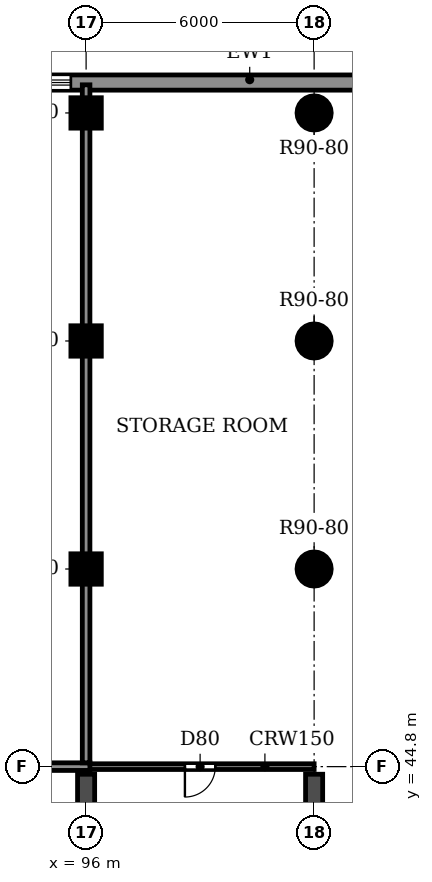
"""IFC4 building model, lengths in metres.
Left out: names, types, materials, properties, quantities, classifications, styles, units other than length and angle.
Written with IfcOpenShell. Run it as: python <this file> out.ifc"""

import sys

from ifc_helpers import new_model, si_unit, direction, frame, frame_2d, origin, origin_2d, place, context, subcontext, project, spatial, rectangle, circle, extrude, source, transform, mapped, element, fill, save


model = new_model("IFC4")
c1 = context("Model", 3, precision=1e-05, world=origin(), true_north=direction((0.0, 1.0)))
c2 = subcontext(c1, "Body", "Model", "MODEL_VIEW")
j1 = project(units=[si_unit("LENGTHUNIT", "METRE"), si_unit("PLANEANGLEUNIT", "RADIAN")], contexts=[c1])
p1 = place(None, origin())
s1 = spatial("IfcSite", under=j1, at=p1, CompositionType="ELEMENT")
p2 = place(p1, origin())
s2 = spatial("IfcBuilding", under=s1, at=p2, CompositionType="ELEMENT")
p3 = place(p2, frame((0.0, 0.0, 10.8)))
s3 = spatial("IfcBuildingStorey", under=s2, at=p3, CompositionType="ELEMENT", Elevation=10.8)
for number, where, z_axis, x_axis in (
    (1, (96.0, 30.55, 0.0), (0.0, 0.0, 1.0), (0.0, 1.0, 0.0)),
    (2, (102.0, 30.55, 0.0), (0.0, 0.0, 1.0), (0.0, 1.0, 0.0)),
):
    element("IfcWall", number, at=place(p3, frame(where, z_axis=z_axis, x_axis=x_axis)), inside=s3, PredefinedType="SHEAR", context=c2, shape_type="SweptSolid", body=[
        extrude(rectangle(XDim=14.05, YDim=0.45, at=frame_2d((7.025, 0.0))), origin(), (0.0, 0.0, 1.0), 3.92),
    ])
m1 = source(origin(), c2, "Body", "SweptSolid", [
    extrude(rectangle(XDim=0.8, YDim=0.8, at=origin_2d()), origin(), (0.0, 0.0, 1.0), 3.92),
])
p4 = place(p3, frame((96.0, 62.0, 0.0), z_axis=(0.0, 0.0, 1.0), x_axis=(1.0, 0.0, 0.0)))
e3 = element("IfcColumn", 3, at=p4, inside=s3, PredefinedType="COLUMN", context=c2, shape_type="MappedRepresentation", body=[
    mapped(m1, transform((0.0, 0.0, 0.0))),
])
m2 = source(origin(), c2, "Body", "SweptSolid", [
    extrude(circle(Radius=0.45, at=origin_2d()), origin(), (0.0, 0.0, 1.0), 3.92),
])
p5 = place(p3, frame((102.0, 62.0, 0.0), z_axis=(0.0, 0.0, 1.0), x_axis=(1.0, 0.0, 0.0)))
e4 = element("IfcColumn", 4, at=p5, inside=s3, PredefinedType="COLUMN", context=c2, shape_type="MappedRepresentation", body=[
    mapped(m2, transform((0.0, 0.0, 0.0))),
])
p6 = place(p3, frame((96.0, 56.0, 0.0), z_axis=(0.0, 0.0, 1.0), x_axis=(1.0, 0.0, 0.0)))
e5 = element("IfcColumn", 5, at=p6, inside=s3, PredefinedType="COLUMN", context=c2, shape_type="MappedRepresentation", body=[
    mapped(m1, transform((0.0, 0.0, 0.0))),
])
p7 = place(p3, frame((102.0, 56.0, 0.0), z_axis=(0.0, 0.0, 1.0), x_axis=(1.0, 0.0, 0.0)))
e6 = element("IfcColumn", 6, at=p7, inside=s3, PredefinedType="COLUMN", context=c2, shape_type="MappedRepresentation", body=[
    mapped(m2, transform((0.0, 0.0, 0.0))),
])
p8 = place(p3, frame((96.0, 50.0, 0.0), z_axis=(0.0, 0.0, 1.0), x_axis=(1.0, 0.0, 0.0)))
e7 = element("IfcColumn", 7, at=p8, inside=s3, PredefinedType="COLUMN", context=c2, shape_type="MappedRepresentation", body=[
    mapped(m1, transform((0.0, 0.0, 0.0))),
])
p9 = place(p3, frame((102.0, 50.0, 0.0), z_axis=(0.0, 0.0, 1.0), x_axis=(1.0, 0.0, 0.0)))
e8 = element("IfcColumn", 8, at=p9, inside=s3, PredefinedType="COLUMN", context=c2, shape_type="MappedRepresentation", body=[
    mapped(m2, transform((0.0, 0.0, 0.0))),
])
p10 = place(p3, frame((105.0, 62.8, 0.0), z_axis=(0.0, 0.0, 1.0), x_axis=(-1.0, 0.0, 0.0)))
e9 = element("IfcWall", 9, at=p10, inside=s3, PredefinedType="STANDARD", context=c2, shape_type="SweptSolid", body=[
    extrude(rectangle(XDim=108.0, YDim=0.4, at=frame_2d((54.0, 0.0))), origin(), (0.0, 0.0, 1.0), 3.92),
])
p11 = place(p10, frame((102.4, 0.0, 0.9)))
e10 = element("IfcOpeningElement", 10, at=p11, cuts=e9, PredefinedType="OPENING", context=c2, shape_type="SweptSolid", body=[
    extrude(rectangle(XDim=2.2, YDim=2.7, at=frame_2d((1.1, 1.35))), frame((0.0, 0.21, 0.0), z_axis=(0.0, -1.0, 0.0), x_axis=(1.0, 0.0, 0.0)), (0.0, 0.0, 1.0), 0.42),
])
p12 = place(p10, frame((99.4, 0.0, 0.9)))
e11 = element("IfcOpeningElement", 11, at=p12, cuts=e9, PredefinedType="OPENING", context=c2, shape_type="SweptSolid", body=[
    extrude(rectangle(XDim=2.2, YDim=2.7, at=frame_2d((1.1, 1.35))), frame((0.0, 0.21, 0.0), z_axis=(0.0, -1.0, 0.0), x_axis=(1.0, 0.0, 0.0)), (0.0, 0.0, 1.0), 0.42),
])
p13 = place(p10, frame((90.4, 0.0, 0.9)))
e12 = element("IfcOpeningElement", 12, at=p13, cuts=e9, PredefinedType="OPENING", context=c2, shape_type="SweptSolid", body=[
    extrude(rectangle(XDim=2.2, YDim=2.7, at=frame_2d((1.1, 1.35))), frame((0.0, 0.21, 0.0), z_axis=(0.0, -1.0, 0.0), x_axis=(1.0, 0.0, 0.0)), (0.0, 0.0, 1.0), 0.42),
])
p14 = place(p10, frame((87.4, 0.0, 0.9)))
e13 = element("IfcOpeningElement", 13, at=p14, cuts=e9, PredefinedType="OPENING", context=c2, shape_type="SweptSolid", body=[
    extrude(rectangle(XDim=2.2, YDim=2.7, at=frame_2d((1.1, 1.35))), frame((0.0, 0.21, 0.0), z_axis=(0.0, -1.0, 0.0), x_axis=(1.0, 0.0, 0.0)), (0.0, 0.0, 1.0), 0.42),
])
p15 = place(p10, frame((84.4, 0.0, 0.9)))
e14 = element("IfcOpeningElement", 14, at=p15, cuts=e9, PredefinedType="OPENING", context=c2, shape_type="SweptSolid", body=[
    extrude(rectangle(XDim=2.2, YDim=2.7, at=frame_2d((1.1, 1.35))), frame((0.0, 0.21, 0.0), z_axis=(0.0, -1.0, 0.0), x_axis=(1.0, 0.0, 0.0)), (0.0, 0.0, 1.0), 0.42),
])
p16 = place(p10, frame((81.4, 0.0, 0.9)))
e15 = element("IfcOpeningElement", 15, at=p16, cuts=e9, PredefinedType="OPENING", context=c2, shape_type="SweptSolid", body=[
    extrude(rectangle(XDim=2.2, YDim=2.7, at=frame_2d((1.1, 1.35))), frame((0.0, 0.21, 0.0), z_axis=(0.0, -1.0, 0.0), x_axis=(1.0, 0.0, 0.0)), (0.0, 0.0, 1.0), 0.42),
])
p17 = place(p10, frame((78.4, 0.0, 0.9)))
e16 = element("IfcOpeningElement", 16, at=p17, cuts=e9, PredefinedType="OPENING", context=c2, shape_type="SweptSolid", body=[
    extrude(rectangle(XDim=2.2, YDim=2.7, at=frame_2d((1.1, 1.35))), frame((0.0, 0.21, 0.0), z_axis=(0.0, -1.0, 0.0), x_axis=(1.0, 0.0, 0.0)), (0.0, 0.0, 1.0), 0.42),
])
p18 = place(p10, frame((75.4, 0.0, 0.9)))
e17 = element("IfcOpeningElement", 17, at=p18, cuts=e9, PredefinedType="OPENING", context=c2, shape_type="SweptSolid", body=[
    extrude(rectangle(XDim=2.2, YDim=2.7, at=frame_2d((1.1, 1.35))), frame((0.0, 0.21, 0.0), z_axis=(0.0, -1.0, 0.0), x_axis=(1.0, 0.0, 0.0)), (0.0, 0.0, 1.0), 0.42),
])
p19 = place(p10, frame((66.4, 0.0, 0.9)))
e18 = element("IfcOpeningElement", 18, at=p19, cuts=e9, PredefinedType="OPENING", context=c2, shape_type="SweptSolid", body=[
    extrude(rectangle(XDim=2.2, YDim=2.7, at=frame_2d((1.1, 1.35))), frame((0.0, 0.21, 0.0), z_axis=(0.0, -1.0, 0.0), x_axis=(1.0, 0.0, 0.0)), (0.0, 0.0, 1.0), 0.42),
])
p20 = place(p10, frame((63.4, 0.0, 0.9)))
e19 = element("IfcOpeningElement", 19, at=p20, cuts=e9, PredefinedType="OPENING", context=c2, shape_type="SweptSolid", body=[
    extrude(rectangle(XDim=2.2, YDim=2.7, at=frame_2d((1.1, 1.35))), frame((0.0, 0.21, 0.0), z_axis=(0.0, -1.0, 0.0), x_axis=(1.0, 0.0, 0.0)), (0.0, 0.0, 1.0), 0.42),
])
p21 = place(p10, frame((60.4, 0.0, 0.9)))
e20 = element("IfcOpeningElement", 20, at=p21, cuts=e9, PredefinedType="OPENING", context=c2, shape_type="SweptSolid", body=[
    extrude(rectangle(XDim=2.2, YDim=2.7, at=frame_2d((1.1, 1.35))), frame((0.0, 0.21, 0.0), z_axis=(0.0, -1.0, 0.0), x_axis=(1.0, 0.0, 0.0)), (0.0, 0.0, 1.0), 0.42),
])
p22 = place(p10, frame((57.4, 0.0, 0.9)))
e21 = element("IfcOpeningElement", 21, at=p22, cuts=e9, PredefinedType="OPENING", context=c2, shape_type="SweptSolid", body=[
    extrude(rectangle(XDim=2.2, YDim=2.7, at=frame_2d((1.1, 1.35))), frame((0.0, 0.21, 0.0), z_axis=(0.0, -1.0, 0.0), x_axis=(1.0, 0.0, 0.0)), (0.0, 0.0, 1.0), 0.42),
])
p23 = place(p10, frame((54.4, 0.0, 0.9)))
e22 = element("IfcOpeningElement", 22, at=p23, cuts=e9, PredefinedType="OPENING", context=c2, shape_type="SweptSolid", body=[
    extrude(rectangle(XDim=2.2, YDim=2.7, at=frame_2d((1.1, 1.35))), frame((0.0, 0.21, 0.0), z_axis=(0.0, -1.0, 0.0), x_axis=(1.0, 0.0, 0.0)), (0.0, 0.0, 1.0), 0.42),
])
p24 = place(p10, frame((51.4, 0.0, 0.9)))
e23 = element("IfcOpeningElement", 23, at=p24, cuts=e9, PredefinedType="OPENING", context=c2, shape_type="SweptSolid", body=[
    extrude(rectangle(XDim=2.2, YDim=2.7, at=frame_2d((1.1, 1.35))), frame((0.0, 0.21, 0.0), z_axis=(0.0, -1.0, 0.0), x_axis=(1.0, 0.0, 0.0)), (0.0, 0.0, 1.0), 0.42),
])
p25 = place(p10, frame((48.4, 0.0, 0.9)))
e24 = element("IfcOpeningElement", 24, at=p25, cuts=e9, PredefinedType="OPENING", context=c2, shape_type="SweptSolid", body=[
    extrude(rectangle(XDim=2.2, YDim=2.7, at=frame_2d((1.1, 1.35))), frame((0.0, 0.21, 0.0), z_axis=(0.0, -1.0, 0.0), x_axis=(1.0, 0.0, 0.0)), (0.0, 0.0, 1.0), 0.42),
])
p26 = place(p10, frame((45.4, 0.0, 0.9)))
e25 = element("IfcOpeningElement", 25, at=p26, cuts=e9, PredefinedType="OPENING", context=c2, shape_type="SweptSolid", body=[
    extrude(rectangle(XDim=2.2, YDim=2.7, at=frame_2d((1.1, 1.35))), frame((0.0, 0.21, 0.0), z_axis=(0.0, -1.0, 0.0), x_axis=(1.0, 0.0, 0.0)), (0.0, 0.0, 1.0), 0.42),
])
p27 = place(p10, frame((42.4, 0.0, 0.9)))
e26 = element("IfcOpeningElement", 26, at=p27, cuts=e9, PredefinedType="OPENING", context=c2, shape_type="SweptSolid", body=[
    extrude(rectangle(XDim=2.2, YDim=2.7, at=frame_2d((1.1, 1.35))), frame((0.0, 0.21, 0.0), z_axis=(0.0, -1.0, 0.0), x_axis=(1.0, 0.0, 0.0)), (0.0, 0.0, 1.0), 0.42),
])
p28 = place(p10, frame((39.4, 0.0, 0.9)))
e27 = element("IfcOpeningElement", 27, at=p28, cuts=e9, PredefinedType="OPENING", context=c2, shape_type="SweptSolid", body=[
    extrude(rectangle(XDim=2.2, YDim=2.7, at=frame_2d((1.1, 1.35))), frame((0.0, 0.21, 0.0), z_axis=(0.0, -1.0, 0.0), x_axis=(1.0, 0.0, 0.0)), (0.0, 0.0, 1.0), 0.42),
])
p29 = place(p10, frame((36.4, 0.0, 0.9)))
e28 = element("IfcOpeningElement", 28, at=p29, cuts=e9, PredefinedType="OPENING", context=c2, shape_type="SweptSolid", body=[
    extrude(rectangle(XDim=2.2, YDim=2.7, at=frame_2d((1.1, 1.35))), frame((0.0, 0.21, 0.0), z_axis=(0.0, -1.0, 0.0), x_axis=(1.0, 0.0, 0.0)), (0.0, 0.0, 1.0), 0.42),
])
p30 = place(p10, frame((33.4, 0.0, 0.9)))
e29 = element("IfcOpeningElement", 29, at=p30, cuts=e9, PredefinedType="OPENING", context=c2, shape_type="SweptSolid", body=[
    extrude(rectangle(XDim=2.2, YDim=2.7, at=frame_2d((1.1, 1.35))), frame((0.0, 0.21, 0.0), z_axis=(0.0, -1.0, 0.0), x_axis=(1.0, 0.0, 0.0)), (0.0, 0.0, 1.0), 0.42),
])
p31 = place(p10, frame((30.4, 0.0, 0.9)))
e30 = element("IfcOpeningElement", 30, at=p31, cuts=e9, PredefinedType="OPENING", context=c2, shape_type="SweptSolid", body=[
    extrude(rectangle(XDim=2.2, YDim=2.7, at=frame_2d((1.1, 1.35))), frame((0.0, 0.21, 0.0), z_axis=(0.0, -1.0, 0.0), x_axis=(1.0, 0.0, 0.0)), (0.0, 0.0, 1.0), 0.42),
])
p32 = place(p10, frame((27.4, 0.0, 0.9)))
e31 = element("IfcOpeningElement", 31, at=p32, cuts=e9, PredefinedType="OPENING", context=c2, shape_type="SweptSolid", body=[
    extrude(rectangle(XDim=2.2, YDim=2.7, at=frame_2d((1.1, 1.35))), frame((0.0, 0.21, 0.0), z_axis=(0.0, -1.0, 0.0), x_axis=(1.0, 0.0, 0.0)), (0.0, 0.0, 1.0), 0.42),
])
p33 = place(p10, frame((24.4, 0.0, 0.9)))
e32 = element("IfcOpeningElement", 32, at=p33, cuts=e9, PredefinedType="OPENING", context=c2, shape_type="SweptSolid", body=[
    extrude(rectangle(XDim=2.2, YDim=2.7, at=frame_2d((1.1, 1.35))), frame((0.0, 0.21, 0.0), z_axis=(0.0, -1.0, 0.0), x_axis=(1.0, 0.0, 0.0)), (0.0, 0.0, 1.0), 0.42),
])
p34 = place(p10, frame((21.4, 0.0, 0.9)))
e33 = element("IfcOpeningElement", 33, at=p34, cuts=e9, PredefinedType="OPENING", context=c2, shape_type="SweptSolid", body=[
    extrude(rectangle(XDim=2.2, YDim=2.7, at=frame_2d((1.1, 1.35))), frame((0.0, 0.21, 0.0), z_axis=(0.0, -1.0, 0.0), x_axis=(1.0, 0.0, 0.0)), (0.0, 0.0, 1.0), 0.42),
])
p35 = place(p10, frame((18.4, 0.0, 0.9)))
e34 = element("IfcOpeningElement", 34, at=p35, cuts=e9, PredefinedType="OPENING", context=c2, shape_type="SweptSolid", body=[
    extrude(rectangle(XDim=2.2, YDim=2.7, at=frame_2d((1.1, 1.35))), frame((0.0, 0.21, 0.0), z_axis=(0.0, -1.0, 0.0), x_axis=(1.0, 0.0, 0.0)), (0.0, 0.0, 1.0), 0.42),
])
p36 = place(p10, frame((15.4, 0.0, 0.9)))
e35 = element("IfcOpeningElement", 35, at=p36, cuts=e9, PredefinedType="OPENING", context=c2, shape_type="SweptSolid", body=[
    extrude(rectangle(XDim=2.2, YDim=2.7, at=frame_2d((1.1, 1.35))), frame((0.0, 0.21, 0.0), z_axis=(0.0, -1.0, 0.0), x_axis=(1.0, 0.0, 0.0)), (0.0, 0.0, 1.0), 0.42),
])
p37 = place(p10, frame((12.4, 0.0, 0.9)))
e36 = element("IfcOpeningElement", 36, at=p37, cuts=e9, PredefinedType="OPENING", context=c2, shape_type="SweptSolid", body=[
    extrude(rectangle(XDim=2.2, YDim=2.7, at=frame_2d((1.1, 1.35))), frame((0.0, 0.21, 0.0), z_axis=(0.0, -1.0, 0.0), x_axis=(1.0, 0.0, 0.0)), (0.0, 0.0, 1.0), 0.42),
])
p38 = place(p10, frame((9.4, 0.0, 0.9)))
e37 = element("IfcOpeningElement", 37, at=p38, cuts=e9, PredefinedType="OPENING", context=c2, shape_type="SweptSolid", body=[
    extrude(rectangle(XDim=2.2, YDim=2.7, at=frame_2d((1.1, 1.35))), frame((0.0, 0.21, 0.0), z_axis=(0.0, -1.0, 0.0), x_axis=(1.0, 0.0, 0.0)), (0.0, 0.0, 1.0), 0.42),
])
p39 = place(p10, frame((93.8, 0.0, 0.0)))
e38 = element("IfcOpeningElement", 38, at=p39, cuts=e9, PredefinedType="OPENING", context=c2, shape_type="SweptSolid", body=[
    extrude(rectangle(XDim=2.0, YDim=2.4, at=frame_2d((1.0, 1.2))), frame((0.0, 0.21, 0.0), z_axis=(0.0, -1.0, 0.0), x_axis=(1.0, 0.0, 0.0)), (0.0, 0.0, 1.0), 0.42),
])
p40 = place(p10, frame((71.63, 0.0, 0.0)))
e39 = element("IfcOpeningElement", 39, at=p40, cuts=e9, PredefinedType="OPENING", context=c2, shape_type="SweptSolid", body=[
    extrude(rectangle(XDim=2.0, YDim=2.4, at=frame_2d((1.0, 1.2))), frame((0.0, 0.21, 0.0), z_axis=(0.0, -1.0, 0.0), x_axis=(1.0, 0.0, 0.0)), (0.0, 0.0, 1.0), 0.42),
])
p41 = place(p3, frame((95.9, 44.8, 0.0), z_axis=(0.0, 0.0, 1.0), x_axis=(1.0, 0.0, 0.0)))
e40 = element("IfcWall", 40, at=p41, inside=s3, PredefinedType="PARTITIONING", context=c2, shape_type="SweptSolid", body=[
    extrude(rectangle(XDim=6.1, YDim=0.15, at=frame_2d((3.05, 0.0))), origin(), (0.0, 0.0, 1.0), 3.92),
])
p42 = place(p41, frame((2.7, 0.0, 0.0)))
e41 = element("IfcOpeningElement", 41, at=p42, cuts=e40, PredefinedType="OPENING", context=c2, shape_type="SweptSolid", body=[
    extrude(rectangle(XDim=0.8, YDim=2.1, at=frame_2d((0.4, 1.05))), frame((0.0, 0.085, 0.0), z_axis=(0.0, -1.0, 0.0), x_axis=(1.0, 0.0, 0.0)), (0.0, 0.0, 1.0), 0.17),
])
p43 = place(p3, frame((90.0, 44.8, 0.0), z_axis=(0.0, 0.0, 1.0), x_axis=(1.0, 0.0, 0.0)))
e42 = element("IfcWall", 42, at=p43, inside=s3, PredefinedType="PARTITIONING", context=c2, shape_type="SweptSolid", body=[
    extrude(rectangle(XDim=6.1, YDim=0.2, at=frame_2d((3.05, 0.0))), origin(), (0.0, 0.0, 1.0), 3.92),
])
p44 = place(p3, frame((96.0, 44.9, 0.0), z_axis=(0.0, 0.0, 1.0), x_axis=(0.0, 1.0, 0.0)))
e43 = element("IfcWall", 43, at=p44, inside=s3, PredefinedType="PARTITIONING", context=c2, shape_type="SweptSolid", body=[
    extrude(rectangle(XDim=17.84, YDim=0.2, at=frame_2d((8.92, 0.0))), origin(), (0.0, 0.0, 1.0), 3.92),
])
p45 = place(p38, origin())
e44 = element("IfcWindow", 44, at=p45, inside=s3, PartitioningType="DOUBLE_PANEL_HORIZONTAL", PredefinedType="WINDOW", context=c2, shape_type="SweptSolid", body=[
    extrude(rectangle(XDim=2.2, YDim=2.7, at=frame_2d((1.1, 1.35))), frame((0.0, 0.03, 0.0), z_axis=(0.0, -1.0, 0.0), x_axis=(1.0, 0.0, 0.0)), (0.0, 0.0, 1.0), 0.06),
])
fill(e37, e44)
p46 = place(p42, frame((0.8, 0.0, 0.0), z_axis=(0.0, 0.0, 1.0), x_axis=(-1.0, 0.0, 0.0)))
e45 = element("IfcDoor", 45, at=p46, inside=s3, OperationType="SINGLE_SWING_RIGHT", PredefinedType="DOOR", context=c2, shape_type="SweptSolid", body=[
    extrude(rectangle(XDim=0.8, YDim=2.1, at=frame_2d((0.4, 1.05))), frame((0.0, 0.025, 0.0), z_axis=(0.0, -1.0, 0.0), x_axis=(1.0, 0.0, 0.0)), (0.0, 0.0, 1.0), 0.05),
])
fill(e41, e45)
save(model, sys.argv[1])
